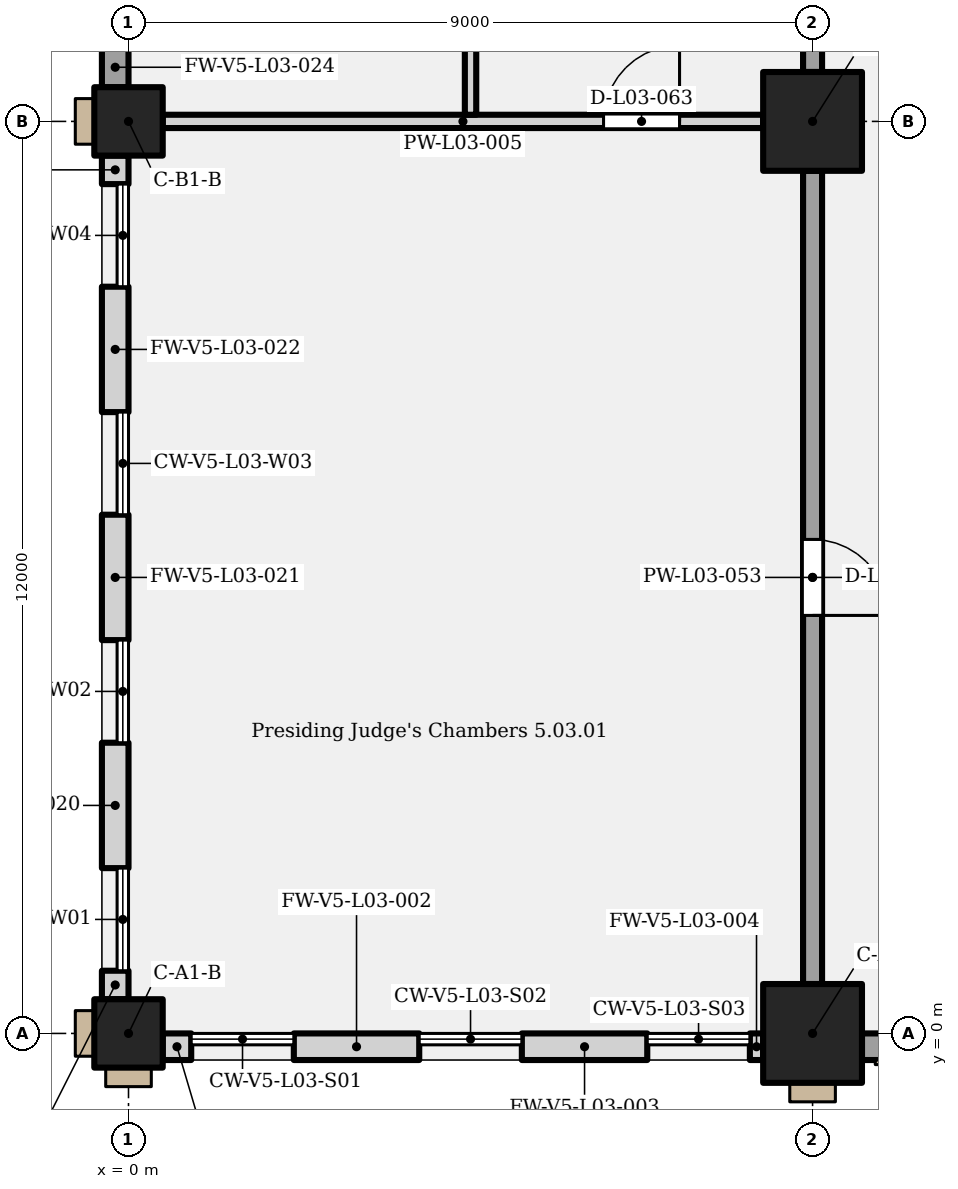
"""IFC4 building model, lengths in metres.
Left out: names, types, materials, properties, quantities, classifications, styles, units other than length and angle.
Written with IfcOpenShell. Run it as: python <this file> out.ifc"""

import sys

from ifc_helpers import new_model, si_unit, direction, frame, frame_2d, origin, origin_with_axes, origin_2d, place, context, subcontext, project, spatial, rectangle, extrude, element, fill, save


model = new_model("IFC4")
c1 = context("Model", 3, precision=1e-05, world=origin(), true_north=direction((0.0, 1.0)))
c2 = subcontext(c1, "Body", "Model", "MODEL_VIEW")
j1 = project(units=[si_unit("LENGTHUNIT", "METRE"), si_unit("PLANEANGLEUNIT", "RADIAN")], contexts=[c1])
p1 = place(None, origin())
s1 = spatial("IfcSite", under=j1, at=p1, CompositionType="ELEMENT")
p2 = place(p1, origin())
s2 = spatial("IfcBuilding", under=s1, at=p2, CompositionType="ELEMENT")
p3 = place(p2, frame((0.0, 0.0, 17.4)))
s3 = spatial("IfcBuildingStorey", under=s2, at=p3, CompositionType="ELEMENT", Elevation=17.4)
p4 = place(p3, origin_with_axes())
e1 = element("IfcColumn", 1, at=p4, inside=s3, PredefinedType="COLUMN", context=c2, shape_type="SweptSolid", body=[
    extrude(rectangle(XDim=0.9, YDim=0.9, at=origin_2d()), origin(), (0.0, 0.0, 1.0), 5.4),
])
p5 = place(p3, frame((9.0, 0.0, 0.0), z_axis=(0.0, 0.0, 1.0), x_axis=(1.0, 0.0, 0.0)))
e2 = element("IfcColumn", 2, at=p5, inside=s3, PredefinedType="COLUMN", context=c2, shape_type="SweptSolid", body=[
    extrude(rectangle(XDim=1.3, YDim=1.3, at=origin_2d()), origin(), (0.0, 0.0, 1.0), 5.4),
])
p6 = place(p3, frame((0.0, 12.0, 0.0), z_axis=(0.0, 0.0, 1.0), x_axis=(1.0, 0.0, 0.0)))
e3 = element("IfcColumn", 3, at=p6, inside=s3, PredefinedType="COLUMN", context=c2, shape_type="SweptSolid", body=[
    extrude(rectangle(XDim=0.9, YDim=0.9, at=origin_2d()), origin(), (0.0, 0.0, 1.0), 5.4),
])
p7 = place(p3, frame((9.0, 12.0, 0.0), z_axis=(0.0, 0.0, 1.0), x_axis=(1.0, 0.0, 0.0)))
e4 = element("IfcColumn", 4, at=p7, inside=s3, PredefinedType="COLUMN", context=c2, shape_type="SweptSolid", body=[
    extrude(rectangle(XDim=1.3, YDim=1.3, at=origin_2d()), origin(), (0.0, 0.0, 1.0), 5.4),
])
p8 = place(p3, frame((0.45, -0.175, 0.0), z_axis=(0.0, 0.0, 1.0), x_axis=(1.0, 0.0, 0.0)))
e5 = element("IfcWall", 5, at=p8, inside=s3, PredefinedType="SOLIDWALL", context=c2, shape_type="SweptSolid", body=[
    extrude(rectangle(XDim=0.375, YDim=0.35, at=frame_2d((0.188, 0.0))), origin(), (0.0, 0.0, 1.0), 5.15),
])
for number, where, z_axis, x_axis in (
    (6, (2.175, -0.175, 0.0), (0.0, 0.0, 1.0), (1.0, 0.0, 0.0)),
    (7, (5.175, -0.175, 0.0), (0.0, 0.0, 1.0), (1.0, 0.0, 0.0)),
):
    element("IfcWall", number, at=place(p3, frame(where, z_axis=z_axis, x_axis=x_axis)), inside=s3, PredefinedType="SOLIDWALL", context=c2, shape_type="SweptSolid", body=[
        extrude(rectangle(XDim=1.65, YDim=0.35, at=frame_2d((0.825, 0.0))), origin(), (0.0, 0.0, 1.0), 5.15),
    ])
p9 = place(p3, frame((8.175, -0.175, 0.0), z_axis=(0.0, 0.0, 1.0), x_axis=(1.0, 0.0, 0.0)))
e8 = element("IfcWall", 8, at=p9, inside=s3, PredefinedType="SOLIDWALL", context=c2, shape_type="SweptSolid", body=[
    extrude(rectangle(XDim=0.175, YDim=0.35, at=frame_2d((0.087, 0.0))), origin(), (0.0, 0.0, 1.0), 5.15),
])
p10 = place(p3, frame((9.65, -0.175, 0.0), z_axis=(0.0, 0.0, 1.0), x_axis=(1.0, 0.0, 0.0)))
e9 = element("IfcWall", 9, at=p10, inside=s3, PredefinedType="SOLIDWALL", context=c2, shape_type="SweptSolid", body=[
    extrude(rectangle(XDim=7.7, YDim=0.35, at=frame_2d((3.85, 0.0))), origin(), (0.0, 0.0, 1.0), 5.15),
])
p11 = place(p3, frame((-0.175, 0.45, 0.0), z_axis=(0.0, 0.0, 1.0), x_axis=(0.0, 1.0, 0.0)))
e10 = element("IfcWall", 10, at=p11, inside=s3, PredefinedType="SOLIDWALL", context=c2, shape_type="SweptSolid", body=[
    extrude(rectangle(XDim=0.375, YDim=0.35, at=frame_2d((0.188, 0.0))), origin(), (0.0, 0.0, 1.0), 5.15),
])
for number, where, z_axis, x_axis in (
    (11, (-0.175, 2.175, 0.0), (0.0, 0.0, 1.0), (0.0, 1.0, 0.0)),
    (12, (-0.175, 5.175, 0.0), (0.0, 0.0, 1.0), (0.0, 1.0, 0.0)),
    (13, (-0.175, 8.175, 0.0), (0.0, 0.0, 1.0), (0.0, 1.0, 0.0)),
):
    element("IfcWall", number, at=place(p3, frame(where, z_axis=z_axis, x_axis=x_axis)), inside=s3, PredefinedType="SOLIDWALL", context=c2, shape_type="SweptSolid", body=[
        extrude(rectangle(XDim=1.65, YDim=0.35, at=frame_2d((0.825, 0.0))), origin(), (0.0, 0.0, 1.0), 5.15),
    ])
p12 = place(p3, frame((-0.175, 11.175, 0.0), z_axis=(0.0, 0.0, 1.0), x_axis=(0.0, 1.0, 0.0)))
e14 = element("IfcWall", 14, at=p12, inside=s3, PredefinedType="SOLIDWALL", context=c2, shape_type="SweptSolid", body=[
    extrude(rectangle(XDim=0.375, YDim=0.35, at=frame_2d((0.188, 0.0))), origin(), (0.0, 0.0, 1.0), 5.15),
])
p13 = place(p3, frame((-0.175, 12.45, 0.0), z_axis=(0.0, 0.0, 1.0), x_axis=(0.0, 1.0, 0.0)))
e15 = element("IfcWall", 15, at=p13, inside=s3, PredefinedType="SOLIDWALL", context=c2, shape_type="SweptSolid", body=[
    extrude(rectangle(XDim=0.525, YDim=0.35, at=frame_2d((0.263, 0.0))), origin(), (0.0, 0.0, 1.0), 5.15),
])
p14 = place(p3, frame((0.45, 12.0, 0.0), z_axis=(0.0, 0.0, 1.0), x_axis=(1.0, 0.0, 0.0)))
e16 = element("IfcWall", 16, at=p14, inside=s3, PredefinedType="PARTITIONING", context=c2, shape_type="SweptSolid", body=[
    extrude(rectangle(XDim=7.9, YDim=0.175, at=frame_2d((3.95, 0.0))), origin(), (0.0, 0.0, 1.0), 4.4),
])
p15 = place(p14, frame((5.8, 0.0, 0.0)))
e17 = element("IfcOpeningElement", 17, at=p15, cuts=e16, PredefinedType="OPENING", context=c2, shape_type="SweptSolid", body=[
    extrude(rectangle(XDim=1.0, YDim=2.1, at=frame_2d((0.5, 1.05))), frame((0.0, 0.097, 0.0), z_axis=(0.0, -1.0, 0.0), x_axis=(1.0, 0.0, 0.0)), (0.0, 0.0, 1.0), 0.195),
])
p16 = place(p3, frame((4.5, 12.087, 0.0), z_axis=(0.0, 0.0, 1.0), x_axis=(0.0, 1.0, 0.0)))
e18 = element("IfcWall", 18, at=p16, inside=s3, PredefinedType="PARTITIONING", context=c2, shape_type="SweptSolid", body=[
    extrude(rectangle(XDim=4.938, YDim=0.15, at=frame_2d((2.469, 0.0))), origin(), (0.0, 0.0, 1.0), 5.15),
])
p17 = place(p3, frame((9.0, 0.65, 0.0), z_axis=(0.0, 0.0, 1.0), x_axis=(0.0, 1.0, 0.0)))
e19 = element("IfcWall", 19, at=p17, inside=s3, PredefinedType="PARTITIONING", context=c2, shape_type="SweptSolid", body=[
    extrude(rectangle(XDim=10.7, YDim=0.25, at=frame_2d((5.35, 0.0))), origin(), (0.0, 0.0, 1.0), 4.4),
])
p18 = place(p17, frame((5.85, 0.0, 0.0), z_axis=(0.0, 0.0, 1.0), x_axis=(-1.0, 0.0, 0.0)))
e20 = element("IfcOpeningElement", 20, at=p18, cuts=e19, PredefinedType="OPENING", context=c2, shape_type="SweptSolid", body=[
    extrude(rectangle(XDim=1.0, YDim=2.1, at=frame_2d((0.5, 1.05))), frame((0.0, 0.135, 0.0), z_axis=(0.0, -1.0, 0.0), x_axis=(1.0, 0.0, 0.0)), (0.0, 0.0, 1.0), 0.27),
])
p19 = place(p3, frame((9.0, 12.65, 0.0), z_axis=(0.0, 0.0, 1.0), x_axis=(0.0, 1.0, 0.0)))
e21 = element("IfcWall", 21, at=p19, inside=s3, PredefinedType="PARTITIONING", context=c2, shape_type="SweptSolid", body=[
    extrude(rectangle(XDim=4.375, YDim=0.25, at=frame_2d((2.188, 0.0))), origin(), (0.0, 0.0, 1.0), 4.2),
])
p20 = place(p15, origin())
e22 = element("IfcDoor", 22, at=p20, inside=s3, OperationType="SINGLE_SWING_RIGHT", PredefinedType="DOOR", context=c2, shape_type="SweptSolid", body=[
    extrude(rectangle(XDim=1.0, YDim=2.1, at=frame_2d((0.5, 1.05))), frame((0.0, 0.025, 0.0), z_axis=(0.0, -1.0, 0.0), x_axis=(1.0, 0.0, 0.0)), (0.0, 0.0, 1.0), 0.05),
])
fill(e17, e22)
p21 = place(p18, origin())
e23 = element("IfcDoor", 23, at=p21, inside=s3, OperationType="SINGLE_SWING_RIGHT", PredefinedType="DOOR", context=c2, shape_type="SweptSolid", body=[
    extrude(rectangle(XDim=1.0, YDim=2.1, at=frame_2d((0.5, 1.05))), frame((0.0, 0.025, 0.0), z_axis=(0.0, -1.0, 0.0), x_axis=(1.0, 0.0, 0.0)), (0.0, 0.0, 1.0), 0.05),
])
fill(e20, e23)
save(model, sys.argv[1])
